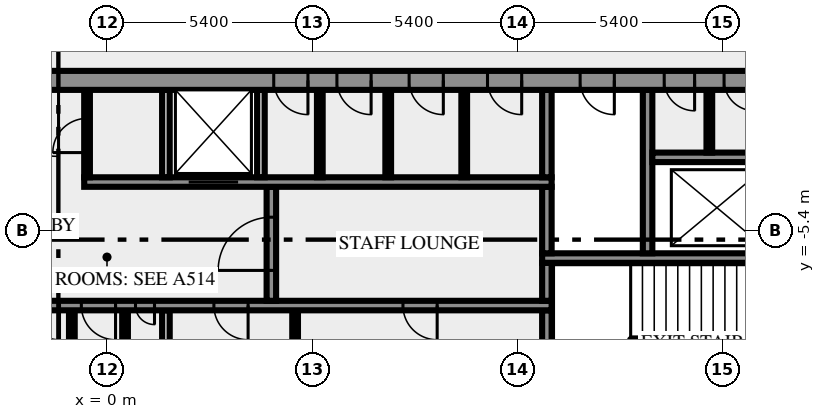
"""IFC4 building model, lengths in metres.
Left out: names, types, materials, properties, quantities, classifications, styles, units other than length and angle.
Written with IfcOpenShell. Run it as: python <this file> out.ifc"""

import sys

from ifc_helpers import new_model, si_unit, direction, frame, frame_2d, origin, place, context, subcontext, project, spatial, rectangle, extrude, element, fill, save


model = new_model("IFC4")
c1 = context("Model", 3, precision=1e-05, world=origin(), true_north=direction((0.0, 1.0)))
c2 = subcontext(c1, "Body", "Model", "MODEL_VIEW")
j1 = project(units=[si_unit("LENGTHUNIT", "METRE"), si_unit("PLANEANGLEUNIT", "RADIAN")], contexts=[c1])
p1 = place(None, origin())
s1 = spatial("IfcSite", under=j1, at=p1, CompositionType="ELEMENT")
p2 = place(p1, origin())
s2 = spatial("IfcBuilding", under=s1, at=p2, CompositionType="ELEMENT")
p3 = place(p2, frame((0.0, 0.0, 293.0)))
s3 = spatial("IfcBuildingStorey", under=s2, at=p3, CompositionType="ELEMENT", Elevation=293.0)
for number, where, z_axis, x_axis in (
    (1, (-0.925, -10.5, 0.0), (0.0, 0.0, 1.0), (0.0, 1.0, 0.0)),
    (2, (0.475, -10.5, 0.0), (0.0, 0.0, 1.0), (0.0, 1.0, 0.0)),
):
    element("IfcWall", number, at=place(p3, frame(where, z_axis=z_axis, x_axis=x_axis)), inside=s3, PredefinedType="PARTITIONING", context=c2, shape_type="SweptSolid", body=[
        extrude(rectangle(XDim=3.0, YDim=0.15, at=frame_2d((1.5, 0.0))), origin(), (0.0, 0.0, 1.0), 3.65),
    ])
p4 = place(p3, frame((1.55, -10.5, 0.0), z_axis=(0.0, 0.0, 1.0), x_axis=(0.0, 1.0, 0.0)))
e3 = element("IfcWall", 3, at=p4, inside=s3, PredefinedType="SOLIDWALL", context=c2, shape_type="SweptSolid", body=[
    extrude(rectangle(XDim=3.0, YDim=0.2, at=frame_2d((1.5, 0.0))), origin(), (0.0, 0.0, 1.0), 3.65),
])
p5 = place(p3, frame((4.95, -10.5, 0.0), z_axis=(0.0, 0.0, 1.0), x_axis=(0.0, 1.0, 0.0)))
e4 = element("IfcWall", 4, at=p5, inside=s3, PredefinedType="PARTITIONING", context=c2, shape_type="SweptSolid", body=[
    extrude(rectangle(XDim=3.0, YDim=0.15, at=frame_2d((1.5, 0.0))), origin(), (0.0, 0.0, 1.0), 3.65),
])
p6 = place(p3, frame((11.575, -10.5, 0.0), z_axis=(0.0, 0.0, 1.0), x_axis=(0.0, 1.0, 0.0)))
e5 = element("IfcWall", 5, at=p6, inside=s3, PredefinedType="SHEAR", context=c2, shape_type="SweptSolid", body=[
    extrude(rectangle(XDim=3.0, YDim=0.25, at=frame_2d((1.5, 0.0))), origin(), (0.0, 0.0, 1.0), 3.65),
])
p7 = place(p3, frame((11.7, -7.375, 0.0), z_axis=(0.0, 0.0, 1.0), x_axis=(-1.0, 0.0, 0.0)))
e6 = element("IfcWall", 6, at=p7, inside=s3, PredefinedType="SHEAR", context=c2, shape_type="SweptSolid", body=[
    extrude(rectangle(XDim=23.4, YDim=0.25, at=frame_2d((11.7, 0.0))), origin(), (0.0, 0.0, 1.0), 3.65),
])
p8 = place(p7, frame((22.225, 0.0, 0.0)))
e7 = element("IfcOpeningElement", 7, at=p8, cuts=e6, PredefinedType="OPENING", context=c2, shape_type="SweptSolid", body=[
    extrude(rectangle(XDim=0.8, YDim=2.1, at=frame_2d((0.4, 1.05))), frame((0.0, 0.135, 0.0), z_axis=(0.0, -1.0, 0.0), x_axis=(1.0, 0.0, 0.0)), (0.0, 0.0, 1.0), 0.27),
])
p9 = place(p7, frame((20.2, 0.0, 0.0)))
e8 = element("IfcOpeningElement", 8, at=p9, cuts=e6, PredefinedType="OPENING", context=c2, shape_type="SweptSolid", body=[
    extrude(rectangle(XDim=1.1, YDim=2.1, at=frame_2d((0.55, 1.05))), frame((0.0, 0.135, 0.0), z_axis=(0.0, -1.0, 0.0), x_axis=(1.0, 0.0, 0.0)), (0.0, 0.0, 1.0), 0.27),
])
p10 = place(p7, frame((17.7, 0.0, 0.0)))
e9 = element("IfcOpeningElement", 9, at=p10, cuts=e6, PredefinedType="OPENING", context=c2, shape_type="SweptSolid", body=[
    extrude(rectangle(XDim=1.1, YDim=2.1, at=frame_2d((0.55, 1.05))), frame((0.0, 0.135, 0.0), z_axis=(0.0, -1.0, 0.0), x_axis=(1.0, 0.0, 0.0)), (0.0, 0.0, 1.0), 0.27),
])
p11 = place(p7, frame((15.975, 0.0, 0.0)))
e10 = element("IfcOpeningElement", 10, at=p11, cuts=e6, PredefinedType="OPENING", context=c2, shape_type="SweptSolid", body=[
    extrude(rectangle(XDim=0.8, YDim=2.1, at=frame_2d((0.4, 1.05))), frame((0.0, 0.135, 0.0), z_axis=(0.0, -1.0, 0.0), x_axis=(1.0, 0.0, 0.0)), (0.0, 0.0, 1.0), 0.27),
])
p12 = place(p7, frame((14.5, 0.0, 0.0)))
e11 = element("IfcOpeningElement", 11, at=p12, cuts=e6, PredefinedType="OPENING", context=c2, shape_type="SweptSolid", body=[
    extrude(rectangle(XDim=0.9, YDim=2.1, at=frame_2d((0.45, 1.05))), frame((0.0, 0.135, 0.0), z_axis=(0.0, -1.0, 0.0), x_axis=(1.0, 0.0, 0.0)), (0.0, 0.0, 1.0), 0.27),
])
p13 = place(p7, frame((12.95, 0.0, 0.0)))
e12 = element("IfcOpeningElement", 12, at=p13, cuts=e6, PredefinedType="OPENING", context=c2, shape_type="SweptSolid", body=[
    extrude(rectangle(XDim=0.9, YDim=2.1, at=frame_2d((0.45, 1.05))), frame((0.0, 0.135, 0.0), z_axis=(0.0, -1.0, 0.0), x_axis=(1.0, 0.0, 0.0)), (0.0, 0.0, 1.0), 0.27),
])
p14 = place(p7, frame((11.475, 0.0, 0.0)))
e13 = element("IfcOpeningElement", 13, at=p14, cuts=e6, PredefinedType="OPENING", context=c2, shape_type="SweptSolid", body=[
    extrude(rectangle(XDim=0.9, YDim=2.1, at=frame_2d((0.45, 1.05))), frame((0.0, 0.135, 0.0), z_axis=(0.0, -1.0, 0.0), x_axis=(1.0, 0.0, 0.0)), (0.0, 0.0, 1.0), 0.27),
])
p15 = place(p7, frame((10.45, 0.0, 0.0)))
e14 = element("IfcOpeningElement", 14, at=p15, cuts=e6, PredefinedType="OPENING", context=c2, shape_type="SweptSolid", body=[
    extrude(rectangle(XDim=0.5, YDim=2.1, at=frame_2d((0.25, 1.05))), frame((0.0, 0.135, 0.0), z_axis=(0.0, -1.0, 0.0), x_axis=(1.0, 0.0, 0.0)), (0.0, 0.0, 1.0), 0.27),
])
p16 = place(p7, frame((7.987, 0.0, 0.0)))
e15 = element("IfcOpeningElement", 15, at=p16, cuts=e6, PredefinedType="OPENING", context=c2, shape_type="SweptSolid", body=[
    extrude(rectangle(XDim=0.9, YDim=2.1, at=frame_2d((0.45, 1.05))), frame((0.0, 0.135, 0.0), z_axis=(0.0, -1.0, 0.0), x_axis=(1.0, 0.0, 0.0)), (0.0, 0.0, 1.0), 0.27),
])
p17 = place(p7, frame((3.012, 0.0, 0.0)))
e16 = element("IfcOpeningElement", 16, at=p17, cuts=e6, PredefinedType="OPENING", context=c2, shape_type="SweptSolid", body=[
    extrude(rectangle(XDim=0.9, YDim=2.1, at=frame_2d((0.45, 1.05))), frame((0.0, 0.135, 0.0), z_axis=(0.0, -1.0, 0.0), x_axis=(1.0, 0.0, 0.0)), (0.0, 0.0, 1.0), 0.27),
])
p18 = place(p3, frame((4.325, -7.25, 0.0), z_axis=(0.0, 0.0, 1.0), x_axis=(0.0, 1.0, 0.0)))
e17 = element("IfcWall", 17, at=p18, inside=s3, PredefinedType="SHEAR", context=c2, shape_type="SweptSolid", body=[
    extrude(rectangle(XDim=3.0, YDim=0.25, at=frame_2d((1.5, 0.0))), origin(), (0.0, 0.0, 1.0), 3.65),
])
p19 = place(p18, frame((0.8, 0.0, 0.0)))
e18 = element("IfcOpeningElement", 18, at=p19, cuts=e17, PredefinedType="OPENING", context=c2, shape_type="SweptSolid", body=[
    extrude(rectangle(XDim=1.4, YDim=2.1, at=frame_2d((0.7, 1.05))), frame((0.0, 0.135, 0.0), z_axis=(0.0, -1.0, 0.0), x_axis=(1.0, 0.0, 0.0)), (0.0, 0.0, 1.0), 0.27),
])
p20 = place(p3, frame((11.575, -7.25, 0.0), z_axis=(0.0, 0.0, 1.0), x_axis=(0.0, 1.0, 0.0)))
e19 = element("IfcWall", 19, at=p20, inside=s3, PredefinedType="SHEAR", context=c2, shape_type="SweptSolid", body=[
    extrude(rectangle(XDim=1.0, YDim=0.25, at=frame_2d((0.5, 0.0))), origin(), (0.0, 0.0, 1.0), 3.65),
])
p21 = place(p3, frame((19.5, -6.125, 0.0), z_axis=(0.0, 0.0, 1.0), x_axis=(-1.0, 0.0, 0.0)))
e20 = element("IfcWall", 20, at=p21, inside=s3, PredefinedType="SHEAR", context=c2, shape_type="SweptSolid", body=[
    extrude(rectangle(XDim=8.05, YDim=0.25, at=frame_2d((4.025, 0.0))), origin(), (0.0, 0.0, 1.0), 3.65),
])
p22 = place(p21, frame((0.05, 0.0, 0.0)))
e21 = element("IfcOpeningElement", 21, at=p22, cuts=e20, PredefinedType="OPENING", context=c2, shape_type="SweptSolid", body=[
    extrude(rectangle(XDim=1.8, YDim=2.1, at=frame_2d((0.9, 1.05))), frame((0.0, 0.135, 0.0), z_axis=(0.0, -1.0, 0.0), x_axis=(1.0, 0.0, 0.0)), (0.0, 0.0, 1.0), 0.27),
])
p23 = place(p3, frame((11.575, -6.0, 0.0), z_axis=(0.0, 0.0, 1.0), x_axis=(0.0, 1.0, 0.0)))
e22 = element("IfcWall", 22, at=p23, inside=s3, PredefinedType="SHEAR", context=c2, shape_type="SweptSolid", body=[
    extrude(rectangle(XDim=1.75, YDim=0.25, at=frame_2d((0.875, 0.0))), origin(), (0.0, 0.0, 1.0), 3.65),
])
p24 = place(p3, frame((14.225, -6.0, 0.0), z_axis=(0.0, 0.0, 1.0), x_axis=(0.0, 1.0, 0.0)))
e23 = element("IfcWall", 23, at=p24, inside=s3, PredefinedType="SHEAR", context=c2, shape_type="SweptSolid", body=[
    extrude(rectangle(XDim=4.3, YDim=0.25, at=frame_2d((2.15, 0.0))), origin(), (0.0, 0.0, 1.0), 3.65),
])
p25 = place(p3, frame((-0.6, -4.125, 0.0), z_axis=(0.0, 0.0, 1.0), x_axis=(1.0, 0.0, 0.0)))
e24 = element("IfcWall", 24, at=p25, inside=s3, PredefinedType="SHEAR", context=c2, shape_type="SweptSolid", body=[
    extrude(rectangle(XDim=12.3, YDim=0.25, at=frame_2d((6.15, 0.0))), origin(), (0.0, 0.0, 1.0), 3.65),
])
p26 = place(p25, frame((2.75, 0.0, 0.0)))
e25 = element("IfcOpeningElement", 25, at=p26, cuts=e24, PredefinedType="OPENING", context=c2, shape_type="SweptSolid", body=[
    extrude(rectangle(XDim=1.3, YDim=2.1, at=frame_2d((0.65, 1.05))), frame((0.0, 0.135, 0.0), z_axis=(0.0, -1.0, 0.0), x_axis=(1.0, 0.0, 0.0)), (0.0, 0.0, 1.0), 0.27),
])
p27 = place(p3, frame((-0.525, -4.0, 0.0), z_axis=(0.0, 0.0, 1.0), x_axis=(0.0, 1.0, 0.0)))
e26 = element("IfcWall", 26, at=p27, inside=s3, PredefinedType="PARTITIONING", context=c2, shape_type="SweptSolid", body=[
    extrude(rectangle(XDim=2.3, YDim=0.15, at=frame_2d((1.15, 0.0))), origin(), (0.0, 0.0, 1.0), 3.65),
])
p28 = place(p27, frame((0.65, 0.0, 0.0)))
e27 = element("IfcOpeningElement", 27, at=p28, cuts=e26, PredefinedType="OPENING", context=c2, shape_type="SweptSolid", body=[
    extrude(rectangle(XDim=0.9, YDim=2.1, at=frame_2d((0.45, 1.05))), frame((0.0, 0.085, 0.0), z_axis=(0.0, -1.0, 0.0), x_axis=(1.0, 0.0, 0.0)), (0.0, 0.0, 1.0), 0.17),
])
for number, where, z_axis, x_axis in (
    (28, (1.55, -4.0, 0.0), (0.0, 0.0, 1.0), (0.0, 1.0, 0.0)),
    (29, (4.05, -4.0, 0.0), (0.0, 0.0, 1.0), (0.0, 1.0, 0.0)),
):
    element("IfcWall", number, at=place(p3, frame(where, z_axis=z_axis, x_axis=x_axis)), inside=s3, PredefinedType="SOLIDWALL", context=c2, shape_type="SweptSolid", body=[
        extrude(rectangle(XDim=2.3, YDim=0.2, at=frame_2d((1.15, 0.0))), origin(), (0.0, 0.0, 1.0), 3.65),
    ])
for number, where, z_axis, x_axis in (
    (30, (5.6, -4.0, 0.0), (0.0, 0.0, 1.0), (0.0, 1.0, 0.0)),
    (31, (7.4, -4.0, 0.0), (0.0, 0.0, 1.0), (0.0, 1.0, 0.0)),
    (32, (9.4, -4.0, 0.0), (0.0, 0.0, 1.0), (0.0, 1.0, 0.0)),
):
    element("IfcWall", number, at=place(p3, frame(where, z_axis=z_axis, x_axis=x_axis)), inside=s3, PredefinedType="PARTITIONING", context=c2, shape_type="SweptSolid", body=[
        extrude(rectangle(XDim=2.3, YDim=0.15, at=frame_2d((1.15, 0.0))), origin(), (0.0, 0.0, 1.0), 3.65),
    ])
p29 = place(p3, frame((11.575, -4.0, 0.0), z_axis=(0.0, 0.0, 1.0), x_axis=(0.0, 1.0, 0.0)))
e33 = element("IfcWall", 33, at=p29, inside=s3, PredefinedType="SHEAR", context=c2, shape_type="SweptSolid", body=[
    extrude(rectangle(XDim=2.3, YDim=0.25, at=frame_2d((1.15, 0.0))), origin(), (0.0, 0.0, 1.0), 3.65),
])
p30 = place(p3, frame((14.35, -3.475, 0.0), z_axis=(0.0, 0.0, 1.0), x_axis=(1.0, 0.0, 0.0)))
e34 = element("IfcWall", 34, at=p30, inside=s3, PredefinedType="SHEAR", context=c2, shape_type="SweptSolid", body=[
    extrude(rectangle(XDim=3.0, YDim=0.25, at=frame_2d((1.5, 0.0))), origin(), (0.0, 0.0, 1.0), 3.65),
])
p31 = place(p3, frame((15.85, -3.35, 0.0), z_axis=(0.0, 0.0, 1.0), x_axis=(0.0, 1.0, 0.0)))
e35 = element("IfcWall", 35, at=p31, inside=s3, PredefinedType="PARTITIONING", context=c2, shape_type="SweptSolid", body=[
    extrude(rectangle(XDim=1.65, YDim=0.15, at=frame_2d((0.825, 0.0))), origin(), (0.0, 0.0, 1.0), 3.65),
])
p32 = place(p3, frame((20.49, -1.45, 0.0), z_axis=(0.0, 0.0, 1.0), x_axis=(-1.0, 0.0, 0.0)))
e36 = element("IfcWall", 36, at=p32, inside=s3, PredefinedType="SHEAR", context=c2, shape_type="SweptSolid", body=[
    extrude(rectangle(XDim=40.98, YDim=0.5, at=frame_2d((20.49, 0.0))), origin(), (0.0, 0.0, 1.0), 3.65),
])
p33 = place(p32, frame((38.14, 0.0, 0.0)))
e37 = element("IfcOpeningElement", 37, at=p33, cuts=e36, PredefinedType="OPENING", context=c2, shape_type="SweptSolid", body=[
    extrude(rectangle(XDim=1.8, YDim=2.1, at=frame_2d((0.9, 1.05))), frame((0.0, 0.26, 0.0), z_axis=(0.0, -1.0, 0.0), x_axis=(1.0, 0.0, 0.0)), (0.0, 0.0, 1.0), 0.52),
])
p34 = place(p32, frame((35.89, 0.0, 0.0)))
e38 = element("IfcOpeningElement", 38, at=p34, cuts=e36, PredefinedType="OPENING", context=c2, shape_type="SweptSolid", body=[
    extrude(rectangle(XDim=0.9, YDim=2.1, at=frame_2d((0.45, 1.05))), frame((0.0, 0.26, 0.0), z_axis=(0.0, -1.0, 0.0), x_axis=(1.0, 0.0, 0.0)), (0.0, 0.0, 1.0), 0.52),
])
p35 = place(p32, frame((32.94, 0.0, 0.0)))
e39 = element("IfcOpeningElement", 39, at=p35, cuts=e36, PredefinedType="OPENING", context=c2, shape_type="SweptSolid", body=[
    extrude(rectangle(XDim=0.9, YDim=2.1, at=frame_2d((0.45, 1.05))), frame((0.0, 0.26, 0.0), z_axis=(0.0, -1.0, 0.0), x_axis=(1.0, 0.0, 0.0)), (0.0, 0.0, 1.0), 0.52),
])
p36 = place(p32, frame((31.015, 0.0, 0.0)))
e40 = element("IfcOpeningElement", 40, at=p36, cuts=e36, PredefinedType="OPENING", context=c2, shape_type="SweptSolid", body=[
    extrude(rectangle(XDim=0.8, YDim=2.1, at=frame_2d((0.4, 1.05))), frame((0.0, 0.26, 0.0), z_axis=(0.0, -1.0, 0.0), x_axis=(1.0, 0.0, 0.0)), (0.0, 0.0, 1.0), 0.52),
])
p37 = place(p32, frame((24.765, 0.0, 0.0)))
e41 = element("IfcOpeningElement", 41, at=p37, cuts=e36, PredefinedType="OPENING", context=c2, shape_type="SweptSolid", body=[
    extrude(rectangle(XDim=0.8, YDim=2.1, at=frame_2d((0.4, 1.05))), frame((0.0, 0.26, 0.0), z_axis=(0.0, -1.0, 0.0), x_axis=(1.0, 0.0, 0.0)), (0.0, 0.0, 1.0), 0.52),
])
p38 = place(p32, frame((21.765, 0.0, 0.0)))
e42 = element("IfcOpeningElement", 42, at=p38, cuts=e36, PredefinedType="OPENING", context=c2, shape_type="SweptSolid", body=[
    extrude(rectangle(XDim=2.0, YDim=2.1, at=frame_2d((1.0, 1.05))), frame((0.0, 0.26, 0.0), z_axis=(0.0, -1.0, 0.0), x_axis=(1.0, 0.0, 0.0)), (0.0, 0.0, 1.0), 0.52),
])
p39 = place(p32, frame((15.202, 0.0, 0.0)))
e43 = element("IfcOpeningElement", 43, at=p39, cuts=e36, PredefinedType="OPENING", context=c2, shape_type="SweptSolid", body=[
    extrude(rectangle(XDim=0.9, YDim=2.1, at=frame_2d((0.45, 1.05))), frame((0.0, 0.26, 0.0), z_axis=(0.0, -1.0, 0.0), x_axis=(1.0, 0.0, 0.0)), (0.0, 0.0, 1.0), 0.52),
])
p40 = place(p32, frame((13.54, 0.0, 0.0)))
e44 = element("IfcOpeningElement", 44, at=p40, cuts=e36, PredefinedType="OPENING", context=c2, shape_type="SweptSolid", body=[
    extrude(rectangle(XDim=0.9, YDim=2.1, at=frame_2d((0.45, 1.05))), frame((0.0, 0.26, 0.0), z_axis=(0.0, -1.0, 0.0), x_axis=(1.0, 0.0, 0.0)), (0.0, 0.0, 1.0), 0.52),
])
p41 = place(p32, frame((11.64, 0.0, 0.0)))
e45 = element("IfcOpeningElement", 45, at=p41, cuts=e36, PredefinedType="OPENING", context=c2, shape_type="SweptSolid", body=[
    extrude(rectangle(XDim=0.9, YDim=2.1, at=frame_2d((0.45, 1.05))), frame((0.0, 0.26, 0.0), z_axis=(0.0, -1.0, 0.0), x_axis=(1.0, 0.0, 0.0)), (0.0, 0.0, 1.0), 0.52),
])
p42 = place(p32, frame((9.577, 0.0, 0.0)))
e46 = element("IfcOpeningElement", 46, at=p42, cuts=e36, PredefinedType="OPENING", context=c2, shape_type="SweptSolid", body=[
    extrude(rectangle(XDim=0.9, YDim=2.1, at=frame_2d((0.45, 1.05))), frame((0.0, 0.26, 0.0), z_axis=(0.0, -1.0, 0.0), x_axis=(1.0, 0.0, 0.0)), (0.0, 0.0, 1.0), 0.52),
])
p43 = place(p32, frame((7.14, 0.0, 0.0)))
e47 = element("IfcOpeningElement", 47, at=p43, cuts=e36, PredefinedType="OPENING", context=c2, shape_type="SweptSolid", body=[
    extrude(rectangle(XDim=0.9, YDim=2.1, at=frame_2d((0.45, 1.05))), frame((0.0, 0.26, 0.0), z_axis=(0.0, -1.0, 0.0), x_axis=(1.0, 0.0, 0.0)), (0.0, 0.0, 1.0), 0.52),
])
p44 = place(p32, frame((5.028, 0.0, 0.0)))
e48 = element("IfcOpeningElement", 48, at=p44, cuts=e36, PredefinedType="OPENING", context=c2, shape_type="SweptSolid", body=[
    extrude(rectangle(XDim=0.8, YDim=2.1, at=frame_2d((0.4, 1.05))), frame((0.0, 0.26, 0.0), z_axis=(0.0, -1.0, 0.0), x_axis=(1.0, 0.0, 0.0)), (0.0, 0.0, 1.0), 0.52),
])
p45 = place(p32, frame((3.452, 0.0, 0.0)))
e49 = element("IfcOpeningElement", 49, at=p45, cuts=e36, PredefinedType="OPENING", context=c2, shape_type="SweptSolid", body=[
    extrude(rectangle(XDim=0.8, YDim=2.1, at=frame_2d((0.4, 1.05))), frame((0.0, 0.26, 0.0), z_axis=(0.0, -1.0, 0.0), x_axis=(1.0, 0.0, 0.0)), (0.0, 0.0, 1.0), 0.52),
])
p46 = place(p32, frame((1.04, 0.0, 0.0)))
e50 = element("IfcOpeningElement", 50, at=p46, cuts=e36, PredefinedType="OPENING", context=c2, shape_type="SweptSolid", body=[
    extrude(rectangle(XDim=1.8, YDim=2.1, at=frame_2d((0.9, 1.05))), frame((0.0, 0.26, 0.0), z_axis=(0.0, -1.0, 0.0), x_axis=(1.0, 0.0, 0.0)), (0.0, 0.0, 1.0), 0.52),
])
p47 = place(p13, origin())
e51 = element("IfcDoor", 51, at=p47, inside=s3, OperationType="SINGLE_SWING_RIGHT", PredefinedType="DOOR", context=c2, shape_type="SweptSolid", body=[
    extrude(rectangle(XDim=0.9, YDim=2.1, at=frame_2d((0.45, 1.05))), frame((0.0, 0.025, 0.0), z_axis=(0.0, -1.0, 0.0), x_axis=(1.0, 0.0, 0.0)), (0.0, 0.0, 1.0), 0.05),
])
fill(e12, e51)
p48 = place(p14, origin())
e52 = element("IfcDoor", 52, at=p48, inside=s3, OperationType="SINGLE_SWING_RIGHT", PredefinedType="DOOR", context=c2, shape_type="SweptSolid", body=[
    extrude(rectangle(XDim=0.9, YDim=2.1, at=frame_2d((0.45, 1.05))), frame((0.0, 0.025, 0.0), z_axis=(0.0, -1.0, 0.0), x_axis=(1.0, 0.0, 0.0)), (0.0, 0.0, 1.0), 0.05),
])
fill(e13, e52)
p49 = place(p15, origin())
e53 = element("IfcDoor", 53, at=p49, inside=s3, OperationType="SINGLE_SWING_LEFT", PredefinedType="DOOR", context=c2, shape_type="SweptSolid", body=[
    extrude(rectangle(XDim=0.5, YDim=2.1, at=frame_2d((0.25, 1.05))), frame((0.0, 0.025, 0.0), z_axis=(0.0, -1.0, 0.0), x_axis=(1.0, 0.0, 0.0)), (0.0, 0.0, 1.0), 0.05),
])
fill(e14, e53)
p50 = place(p16, origin())
e54 = element("IfcDoor", 54, at=p50, inside=s3, OperationType="SINGLE_SWING_LEFT", PredefinedType="DOOR", context=c2, shape_type="SweptSolid", body=[
    extrude(rectangle(XDim=0.9, YDim=2.1, at=frame_2d((0.45, 1.05))), frame((0.0, 0.025, 0.0), z_axis=(0.0, -1.0, 0.0), x_axis=(1.0, 0.0, 0.0)), (0.0, 0.0, 1.0), 0.05),
])
fill(e15, e54)
p51 = place(p17, origin())
e55 = element("IfcDoor", 55, at=p51, inside=s3, OperationType="SINGLE_SWING_LEFT", PredefinedType="DOOR", context=c2, shape_type="SweptSolid", body=[
    extrude(rectangle(XDim=0.9, YDim=2.1, at=frame_2d((0.45, 1.05))), frame((0.0, 0.025, 0.0), z_axis=(0.0, -1.0, 0.0), x_axis=(1.0, 0.0, 0.0)), (0.0, 0.0, 1.0), 0.05),
])
fill(e16, e55)
p52 = place(p19, origin())
e56 = element("IfcDoor", 56, at=p52, inside=s3, OperationType="DOUBLE_DOOR_SINGLE_SWING", PredefinedType="DOOR", context=c2, shape_type="SweptSolid", body=[
    extrude(rectangle(XDim=1.4, YDim=2.1, at=frame_2d((0.7, 1.05))), frame((0.0, 0.025, 0.0), z_axis=(0.0, -1.0, 0.0), x_axis=(1.0, 0.0, 0.0)), (0.0, 0.0, 1.0), 0.05),
])
fill(e18, e56)
p53 = place(p26, origin())
e57 = element("IfcDoor", 57, at=p53, inside=s3, OperationType="DOUBLE_DOOR_SLIDING", PredefinedType="DOOR", context=c2, shape_type="SweptSolid", body=[
    extrude(rectangle(XDim=1.3, YDim=2.1, at=frame_2d((0.65, 1.05))), frame((0.0, 0.025, 0.0), z_axis=(0.0, -1.0, 0.0), x_axis=(1.0, 0.0, 0.0)), (0.0, 0.0, 1.0), 0.05),
])
fill(e25, e57)
p54 = place(p28, origin())
e58 = element("IfcDoor", 58, at=p54, inside=s3, OperationType="SINGLE_SWING_LEFT", PredefinedType="DOOR", context=c2, shape_type="SweptSolid", body=[
    extrude(rectangle(XDim=0.9, YDim=2.1, at=frame_2d((0.45, 1.05))), frame((0.0, 0.025, 0.0), z_axis=(0.0, -1.0, 0.0), x_axis=(1.0, 0.0, 0.0)), (0.0, 0.0, 1.0), 0.05),
])
fill(e27, e58)
p55 = place(p38, origin())
e59 = element("IfcDoor", 59, at=p55, inside=s3, OperationType="DOUBLE_DOOR_SINGLE_SWING", PredefinedType="DOOR", context=c2, shape_type="SweptSolid", body=[
    extrude(rectangle(XDim=2.0, YDim=2.1, at=frame_2d((1.0, 1.05))), frame((0.0, 0.025, 0.0), z_axis=(0.0, -1.0, 0.0), x_axis=(1.0, 0.0, 0.0)), (0.0, 0.0, 1.0), 0.05),
])
fill(e42, e59)
p56 = place(p39, origin())
e60 = element("IfcDoor", 60, at=p56, inside=s3, OperationType="SINGLE_SWING_LEFT", PredefinedType="DOOR", context=c2, shape_type="SweptSolid", body=[
    extrude(rectangle(XDim=0.9, YDim=2.1, at=frame_2d((0.45, 1.05))), frame((0.0, 0.025, 0.0), z_axis=(0.0, -1.0, 0.0), x_axis=(1.0, 0.0, 0.0)), (0.0, 0.0, 1.0), 0.05),
])
fill(e43, e60)
p57 = place(p40, origin())
e61 = element("IfcDoor", 61, at=p57, inside=s3, OperationType="SINGLE_SWING_LEFT", PredefinedType="DOOR", context=c2, shape_type="SweptSolid", body=[
    extrude(rectangle(XDim=0.9, YDim=2.1, at=frame_2d((0.45, 1.05))), frame((0.0, 0.025, 0.0), z_axis=(0.0, -1.0, 0.0), x_axis=(1.0, 0.0, 0.0)), (0.0, 0.0, 1.0), 0.05),
])
fill(e44, e61)
p58 = place(p41, origin())
e62 = element("IfcDoor", 62, at=p58, inside=s3, OperationType="SINGLE_SWING_LEFT", PredefinedType="DOOR", context=c2, shape_type="SweptSolid", body=[
    extrude(rectangle(XDim=0.9, YDim=2.1, at=frame_2d((0.45, 1.05))), frame((0.0, 0.025, 0.0), z_axis=(0.0, -1.0, 0.0), x_axis=(1.0, 0.0, 0.0)), (0.0, 0.0, 1.0), 0.05),
])
fill(e45, e62)
p59 = place(p42, origin())
e63 = element("IfcDoor", 63, at=p59, inside=s3, OperationType="SINGLE_SWING_LEFT", PredefinedType="DOOR", context=c2, shape_type="SweptSolid", body=[
    extrude(rectangle(XDim=0.9, YDim=2.1, at=frame_2d((0.45, 1.05))), frame((0.0, 0.025, 0.0), z_axis=(0.0, -1.0, 0.0), x_axis=(1.0, 0.0, 0.0)), (0.0, 0.0, 1.0), 0.05),
])
fill(e46, e63)
p60 = place(p43, origin())
e64 = element("IfcDoor", 64, at=p60, inside=s3, OperationType="SINGLE_SWING_LEFT", PredefinedType="DOOR", context=c2, shape_type="SweptSolid", body=[
    extrude(rectangle(XDim=0.9, YDim=2.1, at=frame_2d((0.45, 1.05))), frame((0.0, 0.025, 0.0), z_axis=(0.0, -1.0, 0.0), x_axis=(1.0, 0.0, 0.0)), (0.0, 0.0, 1.0), 0.05),
])
fill(e47, e64)
p61 = place(p44, origin())
e65 = element("IfcDoor", 65, at=p61, inside=s3, OperationType="SINGLE_SWING_LEFT", PredefinedType="DOOR", context=c2, shape_type="SweptSolid", body=[
    extrude(rectangle(XDim=0.8, YDim=2.1, at=frame_2d((0.4, 1.05))), frame((0.0, 0.025, 0.0), z_axis=(0.0, -1.0, 0.0), x_axis=(1.0, 0.0, 0.0)), (0.0, 0.0, 1.0), 0.05),
])
fill(e48, e65)
p62 = place(p45, origin())
e66 = element("IfcDoor", 66, at=p62, inside=s3, OperationType="SINGLE_SWING_LEFT", PredefinedType="DOOR", context=c2, shape_type="SweptSolid", body=[
    extrude(rectangle(XDim=0.8, YDim=2.1, at=frame_2d((0.4, 1.05))), frame((0.0, 0.025, 0.0), z_axis=(0.0, -1.0, 0.0), x_axis=(1.0, 0.0, 0.0)), (0.0, 0.0, 1.0), 0.05),
])
fill(e49, e66)
save(model, sys.argv[1])
